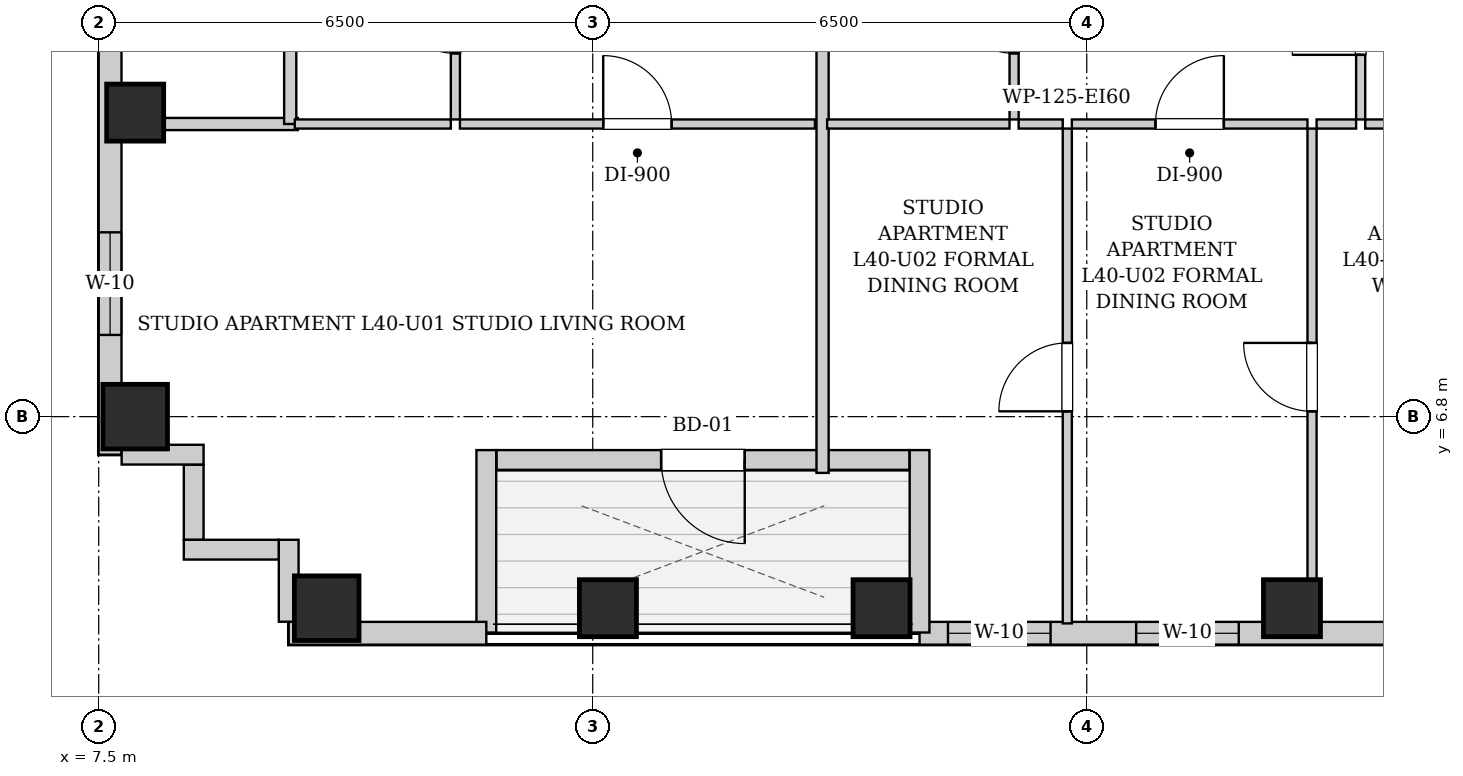
"""IFC4 building model, lengths in metres.
Left out: names, types, materials, properties, quantities, classifications, styles, units other than length and angle.
Written with IfcOpenShell. Run it as: python <this file> out.ifc"""

import sys

from ifc_helpers import new_model, si_unit, direction, frame, frame_2d, origin, origin_2d, place, context, subcontext, project, spatial, rectangle, extrude, element, fill, save


model = new_model("IFC4")
c1 = context("Model", 3, precision=1e-05, world=origin(), true_north=direction((0.0, 1.0)))
c2 = subcontext(c1, "Body", "Model", "MODEL_VIEW")
j1 = project(units=[si_unit("LENGTHUNIT", "METRE"), si_unit("PLANEANGLEUNIT", "RADIAN")], contexts=[c1])
p1 = place(None, origin())
s1 = spatial("IfcSite", under=j1, at=p1, CompositionType="ELEMENT")
p2 = place(p1, origin())
s2 = spatial("IfcBuilding", under=s1, at=p2, CompositionType="ELEMENT")
p3 = place(p2, frame((0.0, 0.0, 140.65)))
s3 = spatial("IfcBuildingStorey", under=s2, at=p3, CompositionType="ELEMENT", Elevation=140.65)
p4 = place(p3, frame((10.5, 4.28, 0.0), z_axis=(0.0, 0.0, 1.0), x_axis=(1.0, 0.0, 0.0)))
e1 = element("IfcColumn", 1, at=p4, inside=s3, PredefinedType="COLUMN", context=c2, shape_type="SweptSolid", body=[
    extrude(rectangle(XDim=0.85, YDim=0.85, at=origin_2d()), origin(), (0.0, 0.0, 1.0), 3.25),
])
for number, where, z_axis, x_axis in (
    (2, (14.2, 4.28, 0.0), (0.0, 0.0, 1.0), (1.0, 0.0, 0.0)),
    (3, (17.8, 4.28, 0.0), (0.0, 0.0, 1.0), (1.0, 0.0, 0.0)),
    (4, (23.2, 4.28, 0.0), (0.0, 0.0, 1.0), (1.0, 0.0, 0.0)),
):
    element("IfcColumn", number, at=place(p3, frame(where, z_axis=z_axis, x_axis=x_axis)), inside=s3, PredefinedType="COLUMN", context=c2, shape_type="SweptSolid", body=[
        extrude(rectangle(XDim=0.75, YDim=0.75, at=origin_2d()), origin(), (0.0, 0.0, 1.0), 3.25),
    ])
p5 = place(p3, frame((7.98, 6.8, 0.0), z_axis=(0.0, 0.0, 1.0), x_axis=(1.0, 0.0, 0.0)))
e5 = element("IfcColumn", 5, at=p5, inside=s3, PredefinedType="COLUMN", context=c2, shape_type="SweptSolid", body=[
    extrude(rectangle(XDim=0.85, YDim=0.85, at=origin_2d()), origin(), (0.0, 0.0, 1.0), 3.25),
])
p6 = place(p3, frame((7.98, 10.8, 0.0), z_axis=(0.0, 0.0, 1.0), x_axis=(1.0, 0.0, 0.0)))
e6 = element("IfcColumn", 6, at=p6, inside=s3, PredefinedType="COLUMN", context=c2, shape_type="SweptSolid", body=[
    extrude(rectangle(XDim=0.75, YDim=0.75, at=origin_2d()), origin(), (0.0, 0.0, 1.0), 3.25),
])
p7 = place(p3, frame((31.5, 3.95, 0.0), z_axis=(0.0, 0.0, 1.0), x_axis=(-1.0, 0.0, 0.0)))
e7 = element("IfcWall", 7, at=p7, inside=s3, PredefinedType="SOLIDWALL", context=c2, shape_type="SweptSolid", body=[
    extrude(rectangle(XDim=13.2, YDim=0.3, at=frame_2d((6.6, 0.0))), origin(), (0.0, 0.0, 1.0), 2.99),
])
p8 = place(p7, frame((11.476, 0.0, 0.55)))
e8 = element("IfcOpeningElement", 8, at=p8, cuts=e7, PredefinedType="OPENING", context=c2, shape_type="SweptSolid", body=[
    extrude(rectangle(XDim=1.35, YDim=1.2, at=frame_2d((0.675, 0.6))), frame((0.0, 0.16, 0.0), z_axis=(0.0, -1.0, 0.0), x_axis=(1.0, 0.0, 0.0)), (0.0, 0.0, 1.0), 0.32),
])
p9 = place(p7, frame((9.0, 0.0, 0.55)))
e9 = element("IfcOpeningElement", 9, at=p9, cuts=e7, PredefinedType="OPENING", context=c2, shape_type="SweptSolid", body=[
    extrude(rectangle(XDim=1.35, YDim=1.2, at=frame_2d((0.675, 0.6))), frame((0.0, 0.16, 0.0), z_axis=(0.0, -1.0, 0.0), x_axis=(1.0, 0.0, 0.0)), (0.0, 0.0, 1.0), 0.32),
])
p10 = place(p7, frame((2.55, 0.0, 0.55)))
e10 = element("IfcOpeningElement", 10, at=p10, cuts=e7, PredefinedType="OPENING", context=c2, shape_type="SweptSolid", body=[
    extrude(rectangle(XDim=1.35, YDim=1.2, at=frame_2d((0.675, 0.6))), frame((0.0, 0.16, 0.0), z_axis=(0.0, -1.0, 0.0), x_axis=(1.0, 0.0, 0.0)), (0.0, 0.0, 1.0), 0.32),
])
p11 = place(p7, frame((0.475, 0.0, 0.55)))
e11 = element("IfcOpeningElement", 11, at=p11, cuts=e7, PredefinedType="OPENING", context=c2, shape_type="SweptSolid", body=[
    extrude(rectangle(XDim=0.85, YDim=1.2, at=frame_2d((0.425, 0.6))), frame((0.0, 0.16, 0.0), z_axis=(0.0, -1.0, 0.0), x_axis=(1.0, 0.0, 0.0)), (0.0, 0.0, 1.0), 0.32),
])
p12 = place(p3, frame((18.3, 3.96, 0.0), z_axis=(0.0, 0.0, 1.0), x_axis=(0.0, 1.0, 0.0)))
e12 = element("IfcWall", 12, at=p12, inside=s3, PredefinedType="SOLIDWALL", context=c2, shape_type="SweptSolid", body=[
    extrude(rectangle(XDim=2.4, YDim=0.26, at=frame_2d((1.2, 0.0))), origin(), (0.0, 0.0, 1.0), 2.99),
])
p13 = place(p3, frame((18.166, 6.23, 0.0), z_axis=(0.0, 0.0, 1.0), x_axis=(-1.0, 0.0, 0.0)))
e13 = element("IfcWall", 13, at=p13, inside=s3, PredefinedType="SOLIDWALL", context=c2, shape_type="SweptSolid", body=[
    extrude(rectangle(XDim=5.432, YDim=0.26, at=frame_2d((2.716, 0.0))), origin(), (0.0, 0.0, 1.0), 2.99),
])
p14 = place(p13, frame((2.166, 0.0, 0.0)))
e14 = element("IfcOpeningElement", 14, at=p14, cuts=e13, PredefinedType="OPENING", context=c2, shape_type="SweptSolid", body=[
    extrude(rectangle(XDim=1.1, YDim=2.0, at=frame_2d((0.55, 1.0))), frame((0.0, 0.14, 0.0), z_axis=(0.0, -1.0, 0.0), x_axis=(1.0, 0.0, 0.0)), (0.0, 0.0, 1.0), 0.28),
])
p15 = place(p3, frame((12.6, 6.36, 0.0), z_axis=(0.0, 0.0, 1.0), x_axis=(0.0, -1.0, 0.0)))
e15 = element("IfcWall", 15, at=p15, inside=s3, PredefinedType="SOLIDWALL", context=c2, shape_type="SweptSolid", body=[
    extrude(rectangle(XDim=2.4, YDim=0.26, at=frame_2d((1.2, 0.0))), origin(), (0.0, 0.0, 1.0), 2.99),
])
p16 = place(p3, frame((12.6, 3.95, 0.0), z_axis=(0.0, 0.0, 1.0), x_axis=(-1.0, 0.0, 0.0)))
e16 = element("IfcWall", 16, at=p16, inside=s3, PredefinedType="SOLIDWALL", context=c2, shape_type="SweptSolid", body=[
    extrude(rectangle(XDim=2.6, YDim=0.3, at=frame_2d((1.3, 0.0))), origin(), (0.0, 0.0, 1.0), 2.99),
])
p17 = place(p3, frame((7.65, 6.3, 0.0), z_axis=(0.0, 0.0, 1.0), x_axis=(0.0, 1.0, 0.0)))
e17 = element("IfcWall", 17, at=p17, inside=s3, PredefinedType="SOLIDWALL", context=c2, shape_type="SweptSolid", body=[
    extrude(rectangle(XDim=34.5, YDim=0.3, at=frame_2d((17.25, 0.0))), origin(), (0.0, 0.0, 1.0), 2.99),
])
p18 = place(p17, frame((1.575, 0.0, 0.55)))
e18 = element("IfcOpeningElement", 18, at=p18, cuts=e17, PredefinedType="OPENING", context=c2, shape_type="SweptSolid", body=[
    extrude(rectangle(XDim=1.35, YDim=1.2, at=frame_2d((0.675, 0.6))), frame((0.0, 0.16, 0.0), z_axis=(0.0, -1.0, 0.0), x_axis=(1.0, 0.0, 0.0)), (0.0, 0.0, 1.0), 0.32),
])
p19 = place(p17, frame((30.075, 0.0, 0.55)))
e19 = element("IfcOpeningElement", 19, at=p19, cuts=e17, PredefinedType="OPENING", context=c2, shape_type="SweptSolid", body=[
    extrude(rectangle(XDim=1.35, YDim=1.2, at=frame_2d((0.675, 0.6))), frame((0.0, 0.16, 0.0), z_axis=(0.0, -1.0, 0.0), x_axis=(1.0, 0.0, 0.0)), (0.0, 0.0, 1.0), 0.32),
])
p20 = place(p17, frame((28.235, 0.0, 0.55)))
e20 = element("IfcOpeningElement", 20, at=p20, cuts=e17, PredefinedType="OPENING", context=c2, shape_type="SweptSolid", body=[
    extrude(rectangle(XDim=1.35, YDim=1.2, at=frame_2d((0.675, 0.6))), frame((0.0, 0.16, 0.0), z_axis=(0.0, -1.0, 0.0), x_axis=(1.0, 0.0, 0.0)), (0.0, 0.0, 1.0), 0.32),
])
p21 = place(p17, frame((11.175, 0.0, 0.55)))
e21 = element("IfcOpeningElement", 21, at=p21, cuts=e17, PredefinedType="OPENING", context=c2, shape_type="SweptSolid", body=[
    extrude(rectangle(XDim=1.35, YDim=1.2, at=frame_2d((0.675, 0.6))), frame((0.0, 0.16, 0.0), z_axis=(0.0, -1.0, 0.0), x_axis=(1.0, 0.0, 0.0)), (0.0, 0.0, 1.0), 0.32),
])
p22 = place(p17, frame((9.235, 0.0, 0.55)))
e22 = element("IfcOpeningElement", 22, at=p22, cuts=e17, PredefinedType="OPENING", context=c2, shape_type="SweptSolid", body=[
    extrude(rectangle(XDim=1.35, YDim=1.2, at=frame_2d((0.675, 0.6))), frame((0.0, 0.16, 0.0), z_axis=(0.0, -1.0, 0.0), x_axis=(1.0, 0.0, 0.0)), (0.0, 0.0, 1.0), 0.32),
])
p23 = place(p17, frame((18.2, 0.0, 0.55)))
e23 = element("IfcOpeningElement", 23, at=p23, cuts=e17, PredefinedType="OPENING", context=c2, shape_type="SweptSolid", body=[
    extrude(rectangle(XDim=1.35, YDim=1.2, at=frame_2d((0.675, 0.6))), frame((0.0, 0.16, 0.0), z_axis=(0.0, -1.0, 0.0), x_axis=(1.0, 0.0, 0.0)), (0.0, 0.0, 1.0), 0.32),
])
p24 = place(p17, frame((19.81, 0.0, 0.55)))
e24 = element("IfcOpeningElement", 24, at=p24, cuts=e17, PredefinedType="OPENING", context=c2, shape_type="SweptSolid", body=[
    extrude(rectangle(XDim=1.35, YDim=1.2, at=frame_2d((0.675, 0.6))), frame((0.0, 0.16, 0.0), z_axis=(0.0, -1.0, 0.0), x_axis=(1.0, 0.0, 0.0)), (0.0, 0.0, 1.0), 0.32),
])
p25 = place(p3, frame((10.0, 4.102, 0.0), z_axis=(0.0, 0.0, 1.0), x_axis=(0.0, 1.0, 0.0)))
e25 = element("IfcWall", 25, at=p25, inside=s3, PredefinedType="SOLIDWALL", context=c2, shape_type="SweptSolid", body=[
    extrude(rectangle(XDim=1.078, YDim=0.26, at=frame_2d((0.539, 0.0))), origin(), (0.0, 0.0, 1.0), 2.99),
])
p26 = place(p3, frame((9.868, 5.05, 0.0), z_axis=(0.0, 0.0, 1.0), x_axis=(-1.0, 0.0, 0.0)))
e26 = element("IfcWall", 26, at=p26, inside=s3, PredefinedType="SOLIDWALL", context=c2, shape_type="SweptSolid", body=[
    extrude(rectangle(XDim=1.248, YDim=0.26, at=frame_2d((0.624, 0.0))), origin(), (0.0, 0.0, 1.0), 2.99),
])
p27 = place(p3, frame((8.75, 5.182, 0.0), z_axis=(0.0, 0.0, 1.0), x_axis=(0.0, 1.0, 0.0)))
e27 = element("IfcWall", 27, at=p27, inside=s3, PredefinedType="SOLIDWALL", context=c2, shape_type="SweptSolid", body=[
    extrude(rectangle(XDim=0.986, YDim=0.26, at=frame_2d((0.493, 0.0))), origin(), (0.0, 0.0, 1.0), 2.99),
])
p28 = place(p3, frame((8.88, 6.3, 0.0), z_axis=(0.0, 0.0, 1.0), x_axis=(-1.0, 0.0, 0.0)))
e28 = element("IfcWall", 28, at=p28, inside=s3, PredefinedType="SOLIDWALL", context=c2, shape_type="SweptSolid", body=[
    extrude(rectangle(XDim=1.078, YDim=0.26, at=frame_2d((0.539, 0.0))), origin(), (0.0, 0.0, 1.0), 2.99),
])
p29 = place(p3, frame((7.78, 10.65, 0.0), z_axis=(0.0, 0.0, 1.0), x_axis=(1.0, 0.0, 0.0)))
e29 = element("IfcWall", 29, at=p29, inside=s3, PredefinedType="PARTITIONING", context=c2, shape_type="SweptSolid", body=[
    extrude(rectangle(XDim=2.34, YDim=0.16, at=frame_2d((1.17, 0.0))), origin(), (0.0, 0.0, 1.0), 2.99),
])
p30 = place(p3, frame((10.02, 10.65, 0.0), z_axis=(0.0, 0.0, 1.0), x_axis=(0.0, 1.0, 0.0)))
e30 = element("IfcWall", 30, at=p30, inside=s3, PredefinedType="PARTITIONING", context=c2, shape_type="SweptSolid", body=[
    extrude(rectangle(XDim=2.66, YDim=0.16, at=frame_2d((1.33, 0.0))), origin(), (0.0, 0.0, 1.0), 2.99),
])
p31 = place(p3, frame((12.193, 10.71, 0.0), z_axis=(0.0, 0.0, 1.0), x_axis=(0.0, 1.0, 0.0)))
e31 = element("IfcWall", 31, at=p31, inside=s3, PredefinedType="PARTITIONING", context=c2, shape_type="SweptSolid", body=[
    extrude(rectangle(XDim=2.6, YDim=0.12, at=frame_2d((1.3, 0.0))), origin(), (0.0, 0.0, 1.0), 2.99),
])
p32 = place(p31, frame((0.87, 0.0, 0.0)))
e32 = element("IfcOpeningElement", 32, at=p32, cuts=e31, PredefinedType="OPENING", context=c2, shape_type="SweptSolid", body=[
    extrude(rectangle(XDim=0.86, YDim=2.05, at=frame_2d((0.43, 1.025))), frame((0.0, 0.07, 0.0), z_axis=(0.0, -1.0, 0.0), x_axis=(1.0, 0.0, 0.0)), (0.0, 0.0, 1.0), 0.14),
])
p33 = place(p3, frame((10.08, 10.65, 0.0), z_axis=(0.0, 0.0, 1.0), x_axis=(1.0, 0.0, 0.0)))
e33 = element("IfcWall", 33, at=p33, inside=s3, PredefinedType="PARTITIONING", context=c2, shape_type="SweptSolid", body=[
    extrude(rectangle(XDim=2.053, YDim=0.12, at=frame_2d((1.026, 0.0))), origin(), (0.0, 0.0, 1.0), 2.99),
])
p34 = place(p3, frame((12.253, 10.65, 0.0), z_axis=(0.0, 0.0, 1.0), x_axis=(1.0, 0.0, 0.0)))
e34 = element("IfcWall", 34, at=p34, inside=s3, PredefinedType="PARTITIONING", context=c2, shape_type="SweptSolid", body=[
    extrude(rectangle(XDim=4.671, YDim=0.12, at=frame_2d((2.335, 0.0))), origin(), (0.0, 0.0, 1.0), 2.99),
])
p35 = place(p34, frame((1.885, 0.0, 0.0)))
e35 = element("IfcOpeningElement", 35, at=p35, cuts=e34, PredefinedType="OPENING", context=c2, shape_type="SweptSolid", body=[
    extrude(rectangle(XDim=0.9, YDim=2.05, at=frame_2d((0.45, 1.025))), frame((0.0, 0.07, 0.0), z_axis=(0.0, -1.0, 0.0), x_axis=(1.0, 0.0, 0.0)), (0.0, 0.0, 1.0), 0.14),
])
p36 = place(p3, frame((17.024, 6.06, 0.0), z_axis=(0.0, 0.0, 1.0), x_axis=(0.0, 1.0, 0.0)))
e36 = element("IfcWall", 36, at=p36, inside=s3, PredefinedType="PARTITIONING", context=c2, shape_type="SweptSolid", body=[
    extrude(rectangle(XDim=7.25, YDim=0.16, at=frame_2d((3.625, 0.0))), origin(), (0.0, 0.0, 1.0), 2.99),
])
p37 = place(p3, frame((19.544, 10.71, 0.0), z_axis=(0.0, 0.0, 1.0), x_axis=(0.0, 1.0, 0.0)))
e37 = element("IfcWall", 37, at=p37, inside=s3, PredefinedType="PARTITIONING", context=c2, shape_type="SweptSolid", body=[
    extrude(rectangle(XDim=2.6, YDim=0.12, at=frame_2d((1.3, 0.0))), origin(), (0.0, 0.0, 1.0), 2.99),
])
p38 = place(p37, frame((0.87, 0.0, 0.0)))
e38 = element("IfcOpeningElement", 38, at=p38, cuts=e37, PredefinedType="OPENING", context=c2, shape_type="SweptSolid", body=[
    extrude(rectangle(XDim=0.86, YDim=2.05, at=frame_2d((0.43, 1.025))), frame((0.0, 0.07, 0.0), z_axis=(0.0, -1.0, 0.0), x_axis=(1.0, 0.0, 0.0)), (0.0, 0.0, 1.0), 0.14),
])
p39 = place(p3, frame((17.084, 10.65, 0.0), z_axis=(0.0, 0.0, 1.0), x_axis=(1.0, 0.0, 0.0)))
e39 = element("IfcWall", 39, at=p39, inside=s3, PredefinedType="PARTITIONING", context=c2, shape_type="SweptSolid", body=[
    extrude(rectangle(XDim=2.4, YDim=0.12, at=frame_2d((1.2, 0.0))), origin(), (0.0, 0.0, 1.0), 2.99),
])
p40 = place(p3, frame((24.104, 10.71, 0.0), z_axis=(0.0, 0.0, 1.0), x_axis=(0.0, 1.0, 0.0)))
e40 = element("IfcWall", 40, at=p40, inside=s3, PredefinedType="PARTITIONING", context=c2, shape_type="SweptSolid", body=[
    extrude(rectangle(XDim=2.6, YDim=0.12, at=frame_2d((1.3, 0.0))), origin(), (0.0, 0.0, 1.0), 2.99),
])
p41 = place(p40, frame((0.85, 0.0, 0.0)))
e41 = element("IfcOpeningElement", 41, at=p41, cuts=e40, PredefinedType="OPENING", context=c2, shape_type="SweptSolid", body=[
    extrude(rectangle(XDim=0.9, YDim=2.05, at=frame_2d((0.45, 1.025))), frame((0.0, 0.07, 0.0), z_axis=(0.0, -1.0, 0.0), x_axis=(1.0, 0.0, 0.0)), (0.0, 0.0, 1.0), 0.14),
])
p42 = place(p3, frame((19.604, 10.65, 0.0), z_axis=(0.0, 0.0, 1.0), x_axis=(1.0, 0.0, 0.0)))
e42 = element("IfcWall", 42, at=p42, inside=s3, PredefinedType="PARTITIONING", context=c2, shape_type="SweptSolid", body=[
    extrude(rectangle(XDim=0.58, YDim=0.12, at=frame_2d((0.29, 0.0))), origin(), (0.0, 0.0, 1.0), 2.99),
])
p43 = place(p3, frame((20.304, 10.65, 0.0), z_axis=(0.0, 0.0, 1.0), x_axis=(1.0, 0.0, 0.0)))
e43 = element("IfcWall", 43, at=p43, inside=s3, PredefinedType="PARTITIONING", context=c2, shape_type="SweptSolid", body=[
    extrude(rectangle(XDim=3.1, YDim=0.12, at=frame_2d((1.55, 0.0))), origin(), (0.0, 0.0, 1.0), 2.99),
])
p44 = place(p43, frame((1.1, 0.0, 0.0)))
e44 = element("IfcOpeningElement", 44, at=p44, cuts=e43, PredefinedType="OPENING", context=c2, shape_type="SweptSolid", body=[
    extrude(rectangle(XDim=0.9, YDim=2.05, at=frame_2d((0.45, 1.025))), frame((0.0, 0.07, 0.0), z_axis=(0.0, -1.0, 0.0), x_axis=(1.0, 0.0, 0.0)), (0.0, 0.0, 1.0), 0.14),
])
p45 = place(p3, frame((23.524, 10.65, 0.0), z_axis=(0.0, 0.0, 1.0), x_axis=(1.0, 0.0, 0.0)))
e45 = element("IfcWall", 45, at=p45, inside=s3, PredefinedType="PARTITIONING", context=c2, shape_type="SweptSolid", body=[
    extrude(rectangle(XDim=0.52, YDim=0.12, at=frame_2d((0.26, 0.0))), origin(), (0.0, 0.0, 1.0), 2.99),
])
p46 = place(p3, frame((24.164, 10.65, 0.0), z_axis=(0.0, 0.0, 1.0), x_axis=(1.0, 0.0, 0.0)))
e46 = element("IfcWall", 46, at=p46, inside=s3, PredefinedType="PARTITIONING", context=c2, shape_type="SweptSolid", body=[
    extrude(rectangle(XDim=2.2, YDim=0.12, at=frame_2d((1.1, 0.0))), origin(), (0.0, 0.0, 1.0), 2.99),
])
p47 = place(p46, frame((0.65, 0.0, 0.0)))
e47 = element("IfcOpeningElement", 47, at=p47, cuts=e46, PredefinedType="OPENING", context=c2, shape_type="SweptSolid", body=[
    extrude(rectangle(XDim=0.9, YDim=2.05, at=frame_2d((0.45, 1.025))), frame((0.0, 0.07, 0.0), z_axis=(0.0, -1.0, 0.0), x_axis=(1.0, 0.0, 0.0)), (0.0, 0.0, 1.0), 0.14),
])
p48 = place(p3, frame((20.244, 4.08, 0.0), z_axis=(0.0, 0.0, 1.0), x_axis=(0.0, 1.0, 0.0)))
e48 = element("IfcWall", 48, at=p48, inside=s3, PredefinedType="PARTITIONING", context=c2, shape_type="SweptSolid", body=[
    extrude(rectangle(XDim=6.51, YDim=0.12, at=frame_2d((3.255, 0.0))), origin(), (0.0, 0.0, 1.0), 2.99),
])
p49 = place(p48, frame((2.79, 0.0, 0.0)))
e49 = element("IfcOpeningElement", 49, at=p49, cuts=e48, PredefinedType="OPENING", context=c2, shape_type="SweptSolid", body=[
    extrude(rectangle(XDim=0.9, YDim=2.05, at=frame_2d((0.45, 1.025))), frame((0.0, 0.07, 0.0), z_axis=(0.0, -1.0, 0.0), x_axis=(1.0, 0.0, 0.0)), (0.0, 0.0, 1.0), 0.14),
])
p50 = place(p3, frame((23.464, 4.08, 0.0), z_axis=(0.0, 0.0, 1.0), x_axis=(0.0, 1.0, 0.0)))
e50 = element("IfcWall", 50, at=p50, inside=s3, PredefinedType="PARTITIONING", context=c2, shape_type="SweptSolid", body=[
    extrude(rectangle(XDim=6.51, YDim=0.12, at=frame_2d((3.255, 0.0))), origin(), (0.0, 0.0, 1.0), 2.99),
])
p51 = place(p50, frame((2.79, 0.0, 0.0)))
e51 = element("IfcOpeningElement", 51, at=p51, cuts=e50, PredefinedType="OPENING", context=c2, shape_type="SweptSolid", body=[
    extrude(rectangle(XDim=0.9, YDim=2.05, at=frame_2d((0.45, 1.025))), frame((0.0, 0.07, 0.0), z_axis=(0.0, -1.0, 0.0), x_axis=(1.0, 0.0, 0.0)), (0.0, 0.0, 1.0), 0.14),
])
p52 = place(p32, origin())
e52 = element("IfcDoor", 52, at=p52, inside=s3, OperationType="SINGLE_SWING_RIGHT", PredefinedType="DOOR", context=c2, shape_type="SweptSolid", body=[
    extrude(rectangle(XDim=0.86, YDim=2.05, at=frame_2d((0.43, 1.025))), frame((0.0, 0.025, 0.0), z_axis=(0.0, -1.0, 0.0), x_axis=(1.0, 0.0, 0.0)), (0.0, 0.0, 1.0), 0.05),
])
fill(e32, e52)
p53 = place(p35, origin())
e53 = element("IfcDoor", 53, at=p53, inside=s3, OperationType="SINGLE_SWING_LEFT", PredefinedType="DOOR", context=c2, shape_type="SweptSolid", body=[
    extrude(rectangle(XDim=0.9, YDim=2.05, at=frame_2d((0.45, 1.025))), frame((0.0, 0.025, 0.0), z_axis=(0.0, -1.0, 0.0), x_axis=(1.0, 0.0, 0.0)), (0.0, 0.0, 1.0), 0.05),
])
fill(e35, e53)
p54 = place(p38, origin())
e54 = element("IfcDoor", 54, at=p54, inside=s3, OperationType="SINGLE_SWING_RIGHT", PredefinedType="DOOR", context=c2, shape_type="SweptSolid", body=[
    extrude(rectangle(XDim=0.86, YDim=2.05, at=frame_2d((0.43, 1.025))), frame((0.0, 0.025, 0.0), z_axis=(0.0, -1.0, 0.0), x_axis=(1.0, 0.0, 0.0)), (0.0, 0.0, 1.0), 0.05),
])
fill(e38, e54)
p55 = place(p41, origin())
e55 = element("IfcDoor", 55, at=p55, inside=s3, OperationType="SINGLE_SWING_LEFT", PredefinedType="DOOR", context=c2, shape_type="SweptSolid", body=[
    extrude(rectangle(XDim=0.9, YDim=2.05, at=frame_2d((0.45, 1.025))), frame((0.0, 0.025, 0.0), z_axis=(0.0, -1.0, 0.0), x_axis=(1.0, 0.0, 0.0)), (0.0, 0.0, 1.0), 0.05),
])
fill(e41, e55)
p56 = place(p44, origin())
e56 = element("IfcDoor", 56, at=p56, inside=s3, OperationType="SINGLE_SWING_RIGHT", PredefinedType="DOOR", context=c2, shape_type="SweptSolid", body=[
    extrude(rectangle(XDim=0.9, YDim=2.05, at=frame_2d((0.45, 1.025))), frame((0.0, 0.025, 0.0), z_axis=(0.0, -1.0, 0.0), x_axis=(1.0, 0.0, 0.0)), (0.0, 0.0, 1.0), 0.05),
])
fill(e44, e56)
p57 = place(p49, origin())
e57 = element("IfcDoor", 57, at=p57, inside=s3, OperationType="SINGLE_SWING_LEFT", PredefinedType="DOOR", context=c2, shape_type="SweptSolid", body=[
    extrude(rectangle(XDim=0.9, YDim=2.05, at=frame_2d((0.45, 1.025))), frame((0.0, 0.025, 0.0), z_axis=(0.0, -1.0, 0.0), x_axis=(1.0, 0.0, 0.0)), (0.0, 0.0, 1.0), 0.05),
])
fill(e49, e57)
p58 = place(p51, origin())
e58 = element("IfcDoor", 58, at=p58, inside=s3, OperationType="SINGLE_SWING_RIGHT", PredefinedType="DOOR", context=c2, shape_type="SweptSolid", body=[
    extrude(rectangle(XDim=0.9, YDim=2.05, at=frame_2d((0.45, 1.025))), frame((0.0, 0.025, 0.0), z_axis=(0.0, -1.0, 0.0), x_axis=(1.0, 0.0, 0.0)), (0.0, 0.0, 1.0), 0.05),
])
fill(e51, e58)
p59 = place(p14, origin())
e59 = element("IfcDoor", 59, at=p59, inside=s3, OperationType="SINGLE_SWING_LEFT", PredefinedType="DOOR", context=c2, shape_type="SweptSolid", body=[
    extrude(rectangle(XDim=1.1, YDim=2.0, at=frame_2d((0.55, 1.0))), frame((0.0, 0.025, 0.0), z_axis=(0.0, -1.0, 0.0), x_axis=(1.0, 0.0, 0.0)), (0.0, 0.0, 1.0), 0.05),
])
fill(e14, e59)
p60 = place(p18, origin())
e60 = element("IfcWindow", 60, at=p60, inside=s3, PartitioningType="SINGLE_PANEL", PredefinedType="WINDOW", context=c2, shape_type="SweptSolid", body=[
    extrude(rectangle(XDim=1.35, YDim=1.2, at=frame_2d((0.675, 0.6))), frame((0.0, 0.03, 0.0), z_axis=(0.0, -1.0, 0.0), x_axis=(1.0, 0.0, 0.0)), (0.0, 0.0, 1.0), 0.06),
])
fill(e18, e60)
p61 = place(p8, origin())
e61 = element("IfcWindow", 61, at=p61, inside=s3, PartitioningType="SINGLE_PANEL", PredefinedType="WINDOW", context=c2, shape_type="SweptSolid", body=[
    extrude(rectangle(XDim=1.35, YDim=1.2, at=frame_2d((0.675, 0.6))), frame((0.0, 0.03, 0.0), z_axis=(0.0, -1.0, 0.0), x_axis=(1.0, 0.0, 0.0)), (0.0, 0.0, 1.0), 0.06),
])
fill(e8, e61)
p62 = place(p9, origin())
e62 = element("IfcWindow", 62, at=p62, inside=s3, PartitioningType="SINGLE_PANEL", PredefinedType="WINDOW", context=c2, shape_type="SweptSolid", body=[
    extrude(rectangle(XDim=1.35, YDim=1.2, at=frame_2d((0.675, 0.6))), frame((0.0, 0.03, 0.0), z_axis=(0.0, -1.0, 0.0), x_axis=(1.0, 0.0, 0.0)), (0.0, 0.0, 1.0), 0.06),
])
fill(e9, e62)
save(model, sys.argv[1])
